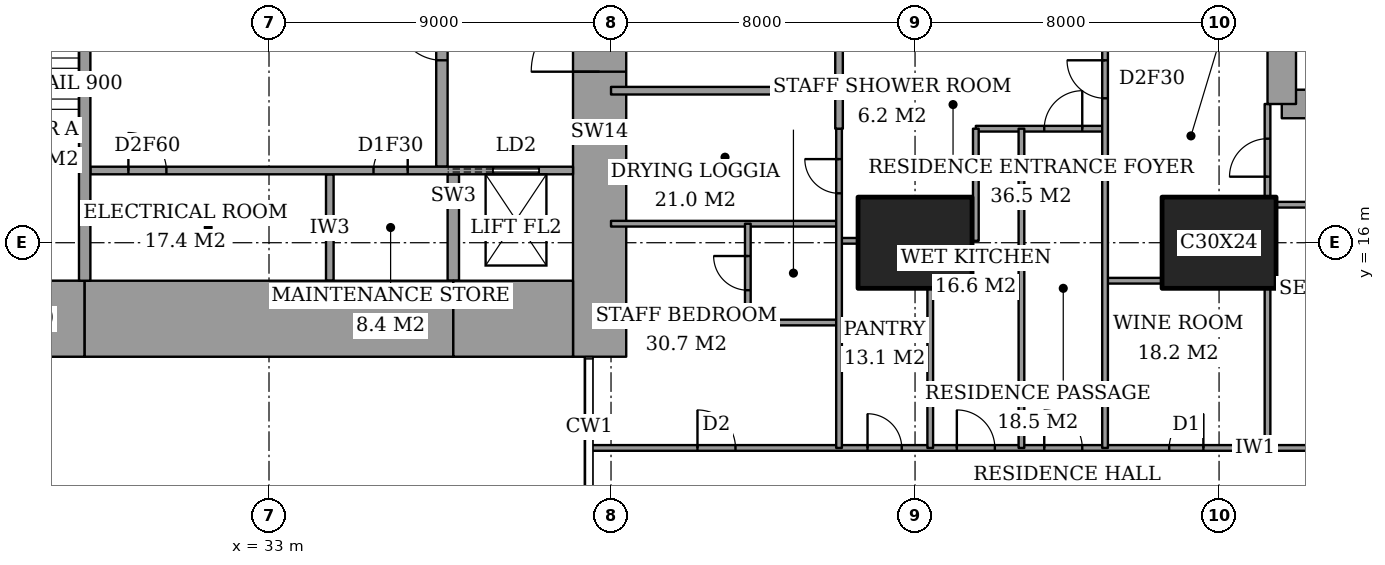
"""IFC4 building model, lengths in metres.
Left out: names, types, materials, properties, quantities, classifications, styles, units other than length and angle.
Written with IfcOpenShell. Run it as: python <this file> out.ifc"""

import sys

from ifc_helpers import new_model, si_unit, direction, frame, frame_2d, origin, origin_2d, place, context, subcontext, project, spatial, rectangle, extrude, element, fill, save


model = new_model("IFC4")
c1 = context("Model", 3, precision=1e-05, world=origin(), true_north=direction((0.0, 1.0)))
c2 = subcontext(c1, "Body", "Model", "MODEL_VIEW")
j1 = project(units=[si_unit("LENGTHUNIT", "METRE"), si_unit("PLANEANGLEUNIT", "RADIAN")], contexts=[c1])
p1 = place(None, origin())
s1 = spatial("IfcSite", under=j1, at=p1, CompositionType="ELEMENT")
p2 = place(p1, origin())
s2 = spatial("IfcBuilding", under=s1, at=p2, CompositionType="ELEMENT")
p3 = place(p2, frame((0.0, 0.0, 196.6)))
s3 = spatial("IfcBuildingStorey", under=s2, at=p3, CompositionType="ELEMENT", Elevation=196.6)
for number, where, z_axis, x_axis in (
    (1, (50.0, 16.0, 0.0), (0.0, 0.0, 1.0), (1.0, 0.0, 0.0)),
    (2, (58.0, 16.0, 0.0), (0.0, 0.0, 1.0), (1.0, 0.0, 0.0)),
):
    element("IfcColumn", number, at=place(p3, frame(where, z_axis=z_axis, x_axis=x_axis)), inside=s3, PredefinedType="COLUMN", context=c2, shape_type="SweptSolid", body=[
        extrude(rectangle(XDim=3.0, YDim=2.4, at=origin_2d()), origin(), (0.0, 0.0, 1.0), 3.6),
    ])
p4 = place(p3, frame((25.0, 14.0, 0.0), z_axis=(0.0, 0.0, 1.0), x_axis=(1.0, 0.0, 0.0)))
e3 = element("IfcWall", 3, at=p4, inside=s3, PredefinedType="SHEAR", context=c2, shape_type="SweptSolid", body=[
    extrude(rectangle(XDim=3.15, YDim=2.0, at=frame_2d((1.575, 0.0))), origin(), (0.0, 0.0, 1.0), 3.6),
])
p5 = place(p3, frame((28.15, 14.0, 0.0), z_axis=(0.0, 0.0, 1.0), x_axis=(1.0, 0.0, 0.0)))
e4 = element("IfcWall", 4, at=p5, inside=s3, PredefinedType="SHEAR", context=c2, shape_type="SweptSolid", body=[
    extrude(rectangle(XDim=9.7, YDim=2.0, at=frame_2d((4.85, 0.0))), origin(), (0.0, 0.0, 1.0), 3.6),
])
p6 = place(p3, frame((37.85, 14.0, 0.0), z_axis=(0.0, 0.0, 1.0), x_axis=(1.0, 0.0, 0.0)))
e5 = element("IfcWall", 5, at=p6, inside=s3, PredefinedType="SHEAR", context=c2, shape_type="SweptSolid", body=[
    extrude(rectangle(XDim=3.15, YDim=2.0, at=frame_2d((1.575, 0.0))), origin(), (0.0, 0.0, 1.0), 3.6),
])
p7 = place(p3, frame((41.7, 13.0, 0.0), z_axis=(0.0, 0.0, 1.0), x_axis=(0.0, 1.0, 0.0)))
e6 = element("IfcWall", 6, at=p7, inside=s3, PredefinedType="SHEAR", context=c2, shape_type="SweptSolid", body=[
    extrude(rectangle(XDim=11.85, YDim=1.4, at=frame_2d((5.925, 0.0))), origin(), (0.0, 0.0, 1.0), 3.6),
])
p8 = place(p7, frame((7.5, 0.0, 0.0)))
e7 = element("IfcOpeningElement", 7, at=p8, cuts=e6, PredefinedType="OPENING", context=c2, shape_type="SweptSolid", body=[
    extrude(rectangle(XDim=1.8, YDim=2.4, at=frame_2d((0.9, 1.2))), frame((0.0, 0.71, 0.0), z_axis=(0.0, -1.0, 0.0), x_axis=(1.0, 0.0, 0.0)), (0.0, 0.0, 1.0), 1.42),
])
p9 = place(p3, frame((28.15, 15.0, 0.0), z_axis=(0.0, 0.0, 1.0), x_axis=(0.0, 1.0, 0.0)))
e8 = element("IfcWall", 8, at=p9, inside=s3, PredefinedType="SHEAR", context=c2, shape_type="SweptSolid", body=[
    extrude(rectangle(XDim=8.15, YDim=0.3, at=frame_2d((4.075, 0.0))), origin(), (0.0, 0.0, 1.0), 3.6),
])
p10 = place(p3, frame((37.55, 18.0, 0.0), z_axis=(0.0, 0.0, 1.0), x_axis=(0.0, 1.0, 0.0)))
e9 = element("IfcWall", 9, at=p10, inside=s3, PredefinedType="PARTITIONING", context=c2, shape_type="SweptSolid", body=[
    extrude(rectangle(XDim=6.7, YDim=0.3, at=frame_2d((3.35, 0.0))), origin(), (0.0, 0.0, 1.0), 3.6),
])
p11 = place(p10, frame((2.8, 0.0, 0.0)))
e10 = element("IfcOpeningElement", 10, at=p11, cuts=e9, PredefinedType="OPENING", context=c2, shape_type="SweptSolid", body=[
    extrude(rectangle(XDim=1.2, YDim=2.1, at=frame_2d((0.6, 1.05))), frame((0.0, 0.16, 0.0), z_axis=(0.0, -1.0, 0.0), x_axis=(1.0, 0.0, 0.0)), (0.0, 0.0, 1.0), 0.32),
])
p12 = place(p3, frame((59.65, 19.65, 0.0), z_axis=(0.0, 0.0, 1.0), x_axis=(1.0, 0.0, 0.0)))
e11 = element("IfcWall", 11, at=p12, inside=s3, PredefinedType="SHEAR", context=c2, shape_type="SweptSolid", body=[
    extrude(rectangle(XDim=4.45, YDim=0.75, at=frame_2d((2.225, 0.0))), origin(), (0.0, 0.0, 1.0), 3.6),
])
p13 = place(p3, frame((59.65, 28.35, 0.0), z_axis=(0.0, 0.0, 1.0), x_axis=(0.0, -1.0, 0.0)))
e12 = element("IfcWall", 12, at=p13, inside=s3, PredefinedType="SHEAR", context=c2, shape_type="SweptSolid", body=[
    extrude(rectangle(XDim=8.7, YDim=0.75, at=frame_2d((4.35, 0.0))), origin(), (0.0, 0.0, 1.0), 3.6),
])
p14 = place(p13, frame((0.975, 0.0, 0.0)))
e13 = element("IfcOpeningElement", 13, at=p14, cuts=e12, PredefinedType="OPENING", context=c2, shape_type="SweptSolid", body=[
    extrude(rectangle(XDim=1.0, YDim=2.1, at=frame_2d((0.5, 1.05))), frame((0.0, 0.385, 0.0), z_axis=(0.0, -1.0, 0.0), x_axis=(1.0, 0.0, 0.0)), (0.0, 0.0, 1.0), 0.77),
])
p15 = place(p3, frame((41.439, 10.6, 0.0), z_axis=(0.0, 0.0, 1.0), x_axis=(1.0, 0.0, 0.0)))
e14 = element("IfcWall", 14, at=p15, inside=s3, PredefinedType="PARTITIONING", context=c2, shape_type="SweptSolid", body=[
    extrude(rectangle(XDim=25.011, YDim=0.15, at=frame_2d((12.505, 0.0))), origin(), (0.0, 0.0, 1.0), 3.35),
])
p16 = place(p15, frame((11.961, 0.0, 0.0)))
e15 = element("IfcOpeningElement", 15, at=p16, cuts=e14, PredefinedType="OPENING", context=c2, shape_type="SweptSolid", body=[
    extrude(rectangle(XDim=1.0, YDim=2.1, at=frame_2d((0.5, 1.05))), frame((0.0, 0.085, 0.0), z_axis=(0.0, -1.0, 0.0), x_axis=(1.0, 0.0, 0.0)), (0.0, 0.0, 1.0), 0.17),
])
p17 = place(p15, frame((20.924, 0.0, 0.0)))
e16 = element("IfcOpeningElement", 16, at=p17, cuts=e14, PredefinedType="OPENING", context=c2, shape_type="SweptSolid", body=[
    extrude(rectangle(XDim=1.0, YDim=2.1, at=frame_2d((0.5, 1.05))), frame((0.0, 0.085, 0.0), z_axis=(0.0, -1.0, 0.0), x_axis=(1.0, 0.0, 0.0)), (0.0, 0.0, 1.0), 0.17),
])
p18 = place(p15, frame((15.249, 0.0, 0.0)))
e17 = element("IfcOpeningElement", 17, at=p18, cuts=e14, PredefinedType="OPENING", context=c2, shape_type="SweptSolid", body=[
    extrude(rectangle(XDim=0.9, YDim=2.1, at=frame_2d((0.45, 1.05))), frame((0.0, 0.085, 0.0), z_axis=(0.0, -1.0, 0.0), x_axis=(1.0, 0.0, 0.0)), (0.0, 0.0, 1.0), 0.17),
])
p19 = place(p15, frame((9.661, 0.0, 0.0)))
e18 = element("IfcOpeningElement", 18, at=p19, cuts=e14, PredefinedType="OPENING", context=c2, shape_type="SweptSolid", body=[
    extrude(rectangle(XDim=1.0, YDim=2.1, at=frame_2d((0.5, 1.05))), frame((0.0, 0.085, 0.0), z_axis=(0.0, -1.0, 0.0), x_axis=(1.0, 0.0, 0.0)), (0.0, 0.0, 1.0), 0.17),
])
p20 = place(p15, frame((7.311, 0.0, 0.0)))
e19 = element("IfcOpeningElement", 19, at=p20, cuts=e14, PredefinedType="OPENING", context=c2, shape_type="SweptSolid", body=[
    extrude(rectangle(XDim=0.9, YDim=2.1, at=frame_2d((0.45, 1.05))), frame((0.0, 0.085, 0.0), z_axis=(0.0, -1.0, 0.0), x_axis=(1.0, 0.0, 0.0)), (0.0, 0.0, 1.0), 0.17),
])
p21 = place(p15, frame((2.836, 0.0, 0.0)))
e20 = element("IfcOpeningElement", 20, at=p21, cuts=e14, PredefinedType="OPENING", context=c2, shape_type="SweptSolid", body=[
    extrude(rectangle(XDim=1.0, YDim=2.1, at=frame_2d((0.5, 1.05))), frame((0.0, 0.085, 0.0), z_axis=(0.0, -1.0, 0.0), x_axis=(1.0, 0.0, 0.0)), (0.0, 0.0, 1.0), 0.17),
])
p22 = place(p3, frame((45.6, 13.9, 0.0), z_axis=(0.0, 0.0, 1.0), x_axis=(1.0, 0.0, 0.0)))
e21 = element("IfcWall", 21, at=p22, inside=s3, PredefinedType="PARTITIONING", context=c2, shape_type="SweptSolid", body=[
    extrude(rectangle(XDim=2.4, YDim=0.15, at=frame_2d((1.2, 0.0))), origin(), (0.0, 0.0, 1.0), 3.35),
])
p23 = place(p3, frame((55.0, 15.0, 0.0), z_axis=(0.0, 0.0, 1.0), x_axis=(1.0, 0.0, 0.0)))
e22 = element("IfcWall", 22, at=p23, inside=s3, PredefinedType="PARTITIONING", context=c2, shape_type="SweptSolid", body=[
    extrude(rectangle(XDim=1.5, YDim=0.15, at=frame_2d((0.75, 0.0))), origin(), (0.0, 0.0, 1.0), 3.35),
])
p24 = place(p3, frame((48.0, 16.05, 0.0), z_axis=(0.0, 0.0, 1.0), x_axis=(1.0, 0.0, 0.0)))
e23 = element("IfcWall", 23, at=p24, inside=s3, PredefinedType="PARTITIONING", context=c2, shape_type="SweptSolid", body=[
    extrude(rectangle(XDim=0.5, YDim=0.15, at=frame_2d((0.25, 0.0))), origin(), (0.0, 0.0, 1.0), 3.35),
])
p25 = place(p3, frame((42.0, 16.5, 0.0), z_axis=(0.0, 0.0, 1.0), x_axis=(1.0, 0.0, 0.0)))
e24 = element("IfcWall", 24, at=p25, inside=s3, PredefinedType="PARTITIONING", context=c2, shape_type="SweptSolid", body=[
    extrude(rectangle(XDim=6.0, YDim=0.15, at=frame_2d((3.0, 0.0))), origin(), (0.0, 0.0, 1.0), 3.35),
])
p26 = place(p3, frame((59.5, 17.0, 0.0), z_axis=(0.0, 0.0, 1.0), x_axis=(1.0, 0.0, 0.0)))
e25 = element("IfcWall", 25, at=p26, inside=s3, PredefinedType="PARTITIONING", context=c2, shape_type="SweptSolid", body=[
    extrude(rectangle(XDim=6.95, YDim=0.15, at=frame_2d((3.475, 0.0))), origin(), (0.0, 0.0, 1.0), 3.35),
])
p27 = place(p3, frame((51.6, 19.0, 0.0), z_axis=(0.0, 0.0, 1.0), x_axis=(1.0, 0.0, 0.0)))
e26 = element("IfcWall", 26, at=p27, inside=s3, PredefinedType="PARTITIONING", context=c2, shape_type="SweptSolid", body=[
    extrude(rectangle(XDim=3.4, YDim=0.15, at=frame_2d((1.7, 0.0))), origin(), (0.0, 0.0, 1.0), 3.35),
])
p28 = place(p27, frame((1.8, 0.0, 0.0)))
e27 = element("IfcOpeningElement", 27, at=p28, cuts=e26, PredefinedType="OPENING", context=c2, shape_type="SweptSolid", body=[
    extrude(rectangle(XDim=1.0, YDim=2.1, at=frame_2d((0.5, 1.05))), frame((0.0, 0.085, 0.0), z_axis=(0.0, -1.0, 0.0), x_axis=(1.0, 0.0, 0.0)), (0.0, 0.0, 1.0), 0.17),
])
p29 = place(p3, frame((42.0, 20.0, 0.0), z_axis=(0.0, 0.0, 1.0), x_axis=(1.0, 0.0, 0.0)))
e28 = element("IfcWall", 28, at=p29, inside=s3, PredefinedType="PARTITIONING", context=c2, shape_type="SweptSolid", body=[
    extrude(rectangle(XDim=6.0, YDim=0.2, at=frame_2d((3.0, 0.0))), origin(), (0.0, 0.0, 1.0), 3.35),
])
p30 = place(p3, frame((45.6, 13.9, 0.0), z_axis=(0.0, 0.0, 1.0), x_axis=(0.0, 1.0, 0.0)))
e29 = element("IfcWall", 29, at=p30, inside=s3, PredefinedType="PARTITIONING", context=c2, shape_type="SweptSolid", body=[
    extrude(rectangle(XDim=2.6, YDim=0.15, at=frame_2d((1.3, 0.0))), origin(), (0.0, 0.0, 1.0), 3.35),
])
p31 = place(p30, frame((0.85, 0.0, 0.0)))
e30 = element("IfcOpeningElement", 30, at=p31, cuts=e29, PredefinedType="OPENING", context=c2, shape_type="SweptSolid", body=[
    extrude(rectangle(XDim=0.9, YDim=2.1, at=frame_2d((0.45, 1.05))), frame((0.0, 0.085, 0.0), z_axis=(0.0, -1.0, 0.0), x_axis=(1.0, 0.0, 0.0)), (0.0, 0.0, 1.0), 0.17),
])
p32 = place(p3, frame((48.0, 19.0, 0.0), z_axis=(0.0, 0.0, 1.0), x_axis=(0.0, 1.0, 0.0)))
e31 = element("IfcWall", 31, at=p32, inside=s3, PredefinedType="PARTITIONING", context=c2, shape_type="SweptSolid", body=[
    extrude(rectangle(XDim=5.0, YDim=0.2, at=frame_2d((2.5, 0.0))), origin(), (0.0, 0.0, 1.0), 3.35),
])
p33 = place(p32, frame((2.4, 0.0, 0.0)))
e32 = element("IfcOpeningElement", 32, at=p33, cuts=e31, PredefinedType="OPENING", context=c2, shape_type="SweptSolid", body=[
    extrude(rectangle(XDim=1.2, YDim=2.4, at=frame_2d((0.6, 1.2))), frame((0.0, 0.11, 0.0), z_axis=(0.0, -1.0, 0.0), x_axis=(1.0, 0.0, 0.0)), (0.0, 0.0, 1.0), 0.22),
])
p34 = place(p3, frame((48.0, 10.6, 0.0), z_axis=(0.0, 0.0, 1.0), x_axis=(0.0, 1.0, 0.0)))
e33 = element("IfcWall", 33, at=p34, inside=s3, PredefinedType="PARTITIONING", context=c2, shape_type="SweptSolid", body=[
    extrude(rectangle(XDim=8.4, YDim=0.15, at=frame_2d((4.2, 0.0))), origin(), (0.0, 0.0, 1.0), 3.35),
])
p35 = place(p34, frame((6.7, 0.0, 0.0)))
e34 = element("IfcOpeningElement", 34, at=p35, cuts=e33, PredefinedType="OPENING", context=c2, shape_type="SweptSolid", body=[
    extrude(rectangle(XDim=0.9, YDim=2.1, at=frame_2d((0.45, 1.05))), frame((0.0, 0.085, 0.0), z_axis=(0.0, -1.0, 0.0), x_axis=(1.0, 0.0, 0.0)), (0.0, 0.0, 1.0), 0.17),
])
p36 = place(p3, frame((50.4, 10.6, 0.0), z_axis=(0.0, 0.0, 1.0), x_axis=(0.0, 1.0, 0.0)))
e35 = element("IfcWall", 35, at=p36, inside=s3, PredefinedType="PARTITIONING", context=c2, shape_type="SweptSolid", body=[
    extrude(rectangle(XDim=4.2, YDim=0.15, at=frame_2d((2.1, 0.0))), origin(), (0.0, 0.0, 1.0), 3.35),
])
p37 = place(p3, frame((51.6, 16.05, 0.0), z_axis=(0.0, 0.0, 1.0), x_axis=(0.0, 1.0, 0.0)))
e36 = element("IfcWall", 36, at=p37, inside=s3, PredefinedType="PARTITIONING", context=c2, shape_type="SweptSolid", body=[
    extrude(rectangle(XDim=2.95, YDim=0.15, at=frame_2d((1.475, 0.0))), origin(), (0.0, 0.0, 1.0), 3.35),
])
p38 = place(p3, frame((52.8, 10.6, 0.0), z_axis=(0.0, 0.0, 1.0), x_axis=(0.0, 1.0, 0.0)))
e37 = element("IfcWall", 37, at=p38, inside=s3, PredefinedType="PARTITIONING", context=c2, shape_type="SweptSolid", body=[
    extrude(rectangle(XDim=8.4, YDim=0.15, at=frame_2d((4.2, 0.0))), origin(), (0.0, 0.0, 1.0), 3.35),
])
p39 = place(p3, frame((55.0, 10.6, 0.0), z_axis=(0.0, 0.0, 1.0), x_axis=(0.0, 1.0, 0.0)))
e38 = element("IfcWall", 38, at=p39, inside=s3, PredefinedType="PARTITIONING", context=c2, shape_type="SweptSolid", body=[
    extrude(rectangle(XDim=11.0, YDim=0.15, at=frame_2d((5.5, 0.0))), origin(), (0.0, 0.0, 1.0), 3.35),
])
p40 = place(p39, frame((9.2, 0.0, 0.0)))
e39 = element("IfcOpeningElement", 39, at=p40, cuts=e38, PredefinedType="OPENING", context=c2, shape_type="SweptSolid", body=[
    extrude(rectangle(XDim=1.0, YDim=2.1, at=frame_2d((0.5, 1.05))), frame((0.0, 0.085, 0.0), z_axis=(0.0, -1.0, 0.0), x_axis=(1.0, 0.0, 0.0)), (0.0, 0.0, 1.0), 0.17),
])
p41 = place(p3, frame((59.275, 10.6, 0.0), z_axis=(0.0, 0.0, 1.0), x_axis=(0.0, 1.0, 0.0)))
e40 = element("IfcWall", 40, at=p41, inside=s3, PredefinedType="PARTITIONING", context=c2, shape_type="SweptSolid", body=[
    extrude(rectangle(XDim=4.2, YDim=0.15, at=frame_2d((2.1, 0.0))), origin(), (0.0, 0.0, 1.0), 3.35),
])
p42 = place(p3, frame((59.275, 17.2, 0.0), z_axis=(0.0, 0.0, 1.0), x_axis=(0.0, 1.0, 0.0)))
e41 = element("IfcWall", 41, at=p42, inside=s3, PredefinedType="PARTITIONING", context=c2, shape_type="SweptSolid", body=[
    extrude(rectangle(XDim=2.45, YDim=0.15, at=frame_2d((1.225, 0.0))), origin(), (0.0, 0.0, 1.0), 3.35),
])
p43 = place(p42, frame((0.538, 0.0, 0.0)))
e42 = element("IfcOpeningElement", 42, at=p43, cuts=e41, PredefinedType="OPENING", context=c2, shape_type="SweptSolid", body=[
    extrude(rectangle(XDim=1.0, YDim=2.1, at=frame_2d((0.5, 1.05))), frame((0.0, 0.085, 0.0), z_axis=(0.0, -1.0, 0.0), x_axis=(1.0, 0.0, 0.0)), (0.0, 0.0, 1.0), 0.17),
])
p44 = place(p3, frame((28.3, 17.9, 0.0), z_axis=(0.0, 0.0, 1.0), x_axis=(1.0, 0.0, 0.0)))
e43 = element("IfcWall", 43, at=p44, inside=s3, PredefinedType="PARTITIONING", context=c2, shape_type="SweptSolid", body=[
    extrude(rectangle(XDim=12.7, YDim=0.2, at=frame_2d((6.35, 0.0))), origin(), (0.0, 0.0, 1.0), 3.6),
])
p45 = place(p44, frame((1.0, 0.0, 0.0)))
e44 = element("IfcOpeningElement", 44, at=p45, cuts=e43, PredefinedType="OPENING", context=c2, shape_type="SweptSolid", body=[
    extrude(rectangle(XDim=1.0, YDim=2.1, at=frame_2d((0.5, 1.05))), frame((0.0, 0.11, 0.0), z_axis=(0.0, -1.0, 0.0), x_axis=(1.0, 0.0, 0.0)), (0.0, 0.0, 1.0), 0.22),
])
p46 = place(p44, frame((7.45, 0.0, 0.0)))
e45 = element("IfcOpeningElement", 45, at=p46, cuts=e43, PredefinedType="OPENING", context=c2, shape_type="SweptSolid", body=[
    extrude(rectangle(XDim=0.9, YDim=2.1, at=frame_2d((0.45, 1.05))), frame((0.0, 0.11, 0.0), z_axis=(0.0, -1.0, 0.0), x_axis=(1.0, 0.0, 0.0)), (0.0, 0.0, 1.0), 0.22),
])
p47 = place(p44, frame((10.6, 0.0, 0.0)))
e46 = element("IfcOpeningElement", 46, at=p47, cuts=e43, PredefinedType="OPENING", context=c2, shape_type="SweptSolid", body=[
    extrude(rectangle(XDim=1.2, YDim=2.1, at=frame_2d((0.6, 1.05))), frame((0.0, 0.11, 0.0), z_axis=(0.0, -1.0, 0.0), x_axis=(1.0, 0.0, 0.0)), (0.0, 0.0, 1.0), 0.22),
])
p48 = place(p3, frame((34.6, 15.0, 0.0), z_axis=(0.0, 0.0, 1.0), x_axis=(0.0, 1.0, 0.0)))
e47 = element("IfcWall", 47, at=p48, inside=s3, PredefinedType="PARTITIONING", context=c2, shape_type="SweptSolid", body=[
    extrude(rectangle(XDim=2.8, YDim=0.2, at=frame_2d((1.4, 0.0))), origin(), (0.0, 0.0, 1.0), 3.6),
])
p49 = place(p3, frame((37.85, 15.0, 0.0), z_axis=(0.0, 0.0, 1.0), x_axis=(0.0, 1.0, 0.0)))
e48 = element("IfcWall", 48, at=p49, inside=s3, PredefinedType="SHEAR", context=c2, shape_type="SweptSolid", body=[
    extrude(rectangle(XDim=2.8, YDim=0.3, at=frame_2d((1.4, 0.0))), origin(), (0.0, 0.0, 1.0), 3.6),
])
p50 = place(p16, origin())
e49 = element("IfcDoor", 49, at=p50, inside=s3, OperationType="SINGLE_SWING_RIGHT", PredefinedType="DOOR", context=c2, shape_type="SweptSolid", body=[
    extrude(rectangle(XDim=1.0, YDim=2.1, at=frame_2d((0.5, 1.05))), frame((0.0, 0.025, 0.0), z_axis=(0.0, -1.0, 0.0), x_axis=(1.0, 0.0, 0.0)), (0.0, 0.0, 1.0), 0.05),
])
fill(e15, e49)
p51 = place(p43, origin())
e50 = element("IfcDoor", 50, at=p51, inside=s3, OperationType="SINGLE_SWING_RIGHT", PredefinedType="DOOR", context=c2, shape_type="SweptSolid", body=[
    extrude(rectangle(XDim=1.0, YDim=2.1, at=frame_2d((0.5, 1.05))), frame((0.0, 0.025, 0.0), z_axis=(0.0, -1.0, 0.0), x_axis=(1.0, 0.0, 0.0)), (0.0, 0.0, 1.0), 0.05),
])
fill(e42, e50)
p52 = place(p18, origin())
e51 = element("IfcDoor", 51, at=p52, inside=s3, OperationType="SINGLE_SWING_LEFT", PredefinedType="DOOR", context=c2, shape_type="SweptSolid", body=[
    extrude(rectangle(XDim=0.9, YDim=2.1, at=frame_2d((0.45, 1.05))), frame((0.0, 0.025, 0.0), z_axis=(0.0, -1.0, 0.0), x_axis=(1.0, 0.0, 0.0)), (0.0, 0.0, 1.0), 0.05),
])
fill(e17, e51)
p53 = place(p40, origin())
e52 = element("IfcDoor", 52, at=p53, inside=s3, OperationType="SINGLE_SWING_LEFT", PredefinedType="DOOR", context=c2, shape_type="SweptSolid", body=[
    extrude(rectangle(XDim=1.0, YDim=2.1, at=frame_2d((0.5, 1.05))), frame((0.0, 0.025, 0.0), z_axis=(0.0, -1.0, 0.0), x_axis=(1.0, 0.0, 0.0)), (0.0, 0.0, 1.0), 0.05),
])
fill(e39, e52)
p54 = place(p28, origin())
e53 = element("IfcDoor", 53, at=p54, inside=s3, OperationType="SINGLE_SWING_LEFT", PredefinedType="DOOR", context=c2, shape_type="SweptSolid", body=[
    extrude(rectangle(XDim=1.0, YDim=2.1, at=frame_2d((0.5, 1.05))), frame((0.0, 0.025, 0.0), z_axis=(0.0, -1.0, 0.0), x_axis=(1.0, 0.0, 0.0)), (0.0, 0.0, 1.0), 0.05),
])
fill(e27, e53)
p55 = place(p19, origin())
e54 = element("IfcDoor", 54, at=p55, inside=s3, OperationType="SINGLE_SWING_RIGHT", PredefinedType="DOOR", context=c2, shape_type="SweptSolid", body=[
    extrude(rectangle(XDim=1.0, YDim=2.1, at=frame_2d((0.5, 1.05))), frame((0.0, 0.025, 0.0), z_axis=(0.0, -1.0, 0.0), x_axis=(1.0, 0.0, 0.0)), (0.0, 0.0, 1.0), 0.05),
])
fill(e18, e54)
p56 = place(p20, origin())
e55 = element("IfcDoor", 55, at=p56, inside=s3, OperationType="SINGLE_SWING_RIGHT", PredefinedType="DOOR", context=c2, shape_type="SweptSolid", body=[
    extrude(rectangle(XDim=0.9, YDim=2.1, at=frame_2d((0.45, 1.05))), frame((0.0, 0.025, 0.0), z_axis=(0.0, -1.0, 0.0), x_axis=(1.0, 0.0, 0.0)), (0.0, 0.0, 1.0), 0.05),
])
fill(e19, e55)
p57 = place(p31, origin())
e56 = element("IfcDoor", 56, at=p57, inside=s3, OperationType="SINGLE_SWING_LEFT", PredefinedType="DOOR", context=c2, shape_type="SweptSolid", body=[
    extrude(rectangle(XDim=0.9, YDim=2.1, at=frame_2d((0.45, 1.05))), frame((0.0, 0.025, 0.0), z_axis=(0.0, -1.0, 0.0), x_axis=(1.0, 0.0, 0.0)), (0.0, 0.0, 1.0), 0.05),
])
fill(e30, e56)
p58 = place(p21, origin())
e57 = element("IfcDoor", 57, at=p58, inside=s3, OperationType="SINGLE_SWING_RIGHT", PredefinedType="DOOR", context=c2, shape_type="SweptSolid", body=[
    extrude(rectangle(XDim=1.0, YDim=2.1, at=frame_2d((0.5, 1.05))), frame((0.0, 0.025, 0.0), z_axis=(0.0, -1.0, 0.0), x_axis=(1.0, 0.0, 0.0)), (0.0, 0.0, 1.0), 0.05),
])
fill(e20, e57)
p59 = place(p35, origin())
e58 = element("IfcDoor", 58, at=p59, inside=s3, OperationType="SINGLE_SWING_LEFT", PredefinedType="DOOR", context=c2, shape_type="SweptSolid", body=[
    extrude(rectangle(XDim=0.9, YDim=2.1, at=frame_2d((0.45, 1.05))), frame((0.0, 0.025, 0.0), z_axis=(0.0, -1.0, 0.0), x_axis=(1.0, 0.0, 0.0)), (0.0, 0.0, 1.0), 0.05),
])
fill(e34, e58)
p60 = place(p11, origin())
e59 = element("IfcDoor", 59, at=p60, inside=s3, OperationType="SINGLE_SWING_LEFT", PredefinedType="DOOR", context=c2, shape_type="SweptSolid", body=[
    extrude(rectangle(XDim=1.2, YDim=2.1, at=frame_2d((0.6, 1.05))), frame((0.0, 0.025, 0.0), z_axis=(0.0, -1.0, 0.0), x_axis=(1.0, 0.0, 0.0)), (0.0, 0.0, 1.0), 0.05),
])
fill(e10, e59)
p61 = place(p8, origin())
e60 = element("IfcDoor", 60, at=p61, inside=s3, OperationType="DOUBLE_DOOR_DOUBLE_SWING", PredefinedType="DOOR", context=c2, shape_type="SweptSolid", body=[
    extrude(rectangle(XDim=1.8, YDim=2.4, at=frame_2d((0.9, 1.2))), frame((0.0, 0.025, 0.0), z_axis=(0.0, -1.0, 0.0), x_axis=(1.0, 0.0, 0.0)), (0.0, 0.0, 1.0), 0.05),
])
fill(e7, e60)
p62 = place(p45, origin())
e61 = element("IfcDoor", 61, at=p62, inside=s3, OperationType="SINGLE_SWING_RIGHT", PredefinedType="DOOR", context=c2, shape_type="SweptSolid", body=[
    extrude(rectangle(XDim=1.0, YDim=2.1, at=frame_2d((0.5, 1.05))), frame((0.0, 0.025, 0.0), z_axis=(0.0, -1.0, 0.0), x_axis=(1.0, 0.0, 0.0)), (0.0, 0.0, 1.0), 0.05),
])
fill(e44, e61)
p63 = place(p46, origin())
e62 = element("IfcDoor", 62, at=p63, inside=s3, OperationType="SINGLE_SWING_LEFT", PredefinedType="DOOR", context=c2, shape_type="SweptSolid", body=[
    extrude(rectangle(XDim=0.9, YDim=2.1, at=frame_2d((0.45, 1.05))), frame((0.0, 0.025, 0.0), z_axis=(0.0, -1.0, 0.0), x_axis=(1.0, 0.0, 0.0)), (0.0, 0.0, 1.0), 0.05),
])
fill(e45, e62)
p64 = place(p47, origin())
e63 = element("IfcDoor", 63, at=p64, inside=s3, OperationType="SLIDING_TO_LEFT", PredefinedType="DOOR", context=c2, shape_type="SweptSolid", body=[
    extrude(rectangle(XDim=1.2, YDim=2.1, at=frame_2d((0.6, 1.05))), frame((0.0, 0.025, 0.0), z_axis=(0.0, -1.0, 0.0), x_axis=(1.0, 0.0, 0.0)), (0.0, 0.0, 1.0), 0.05),
])
fill(e46, e63)
save(model, sys.argv[1])
